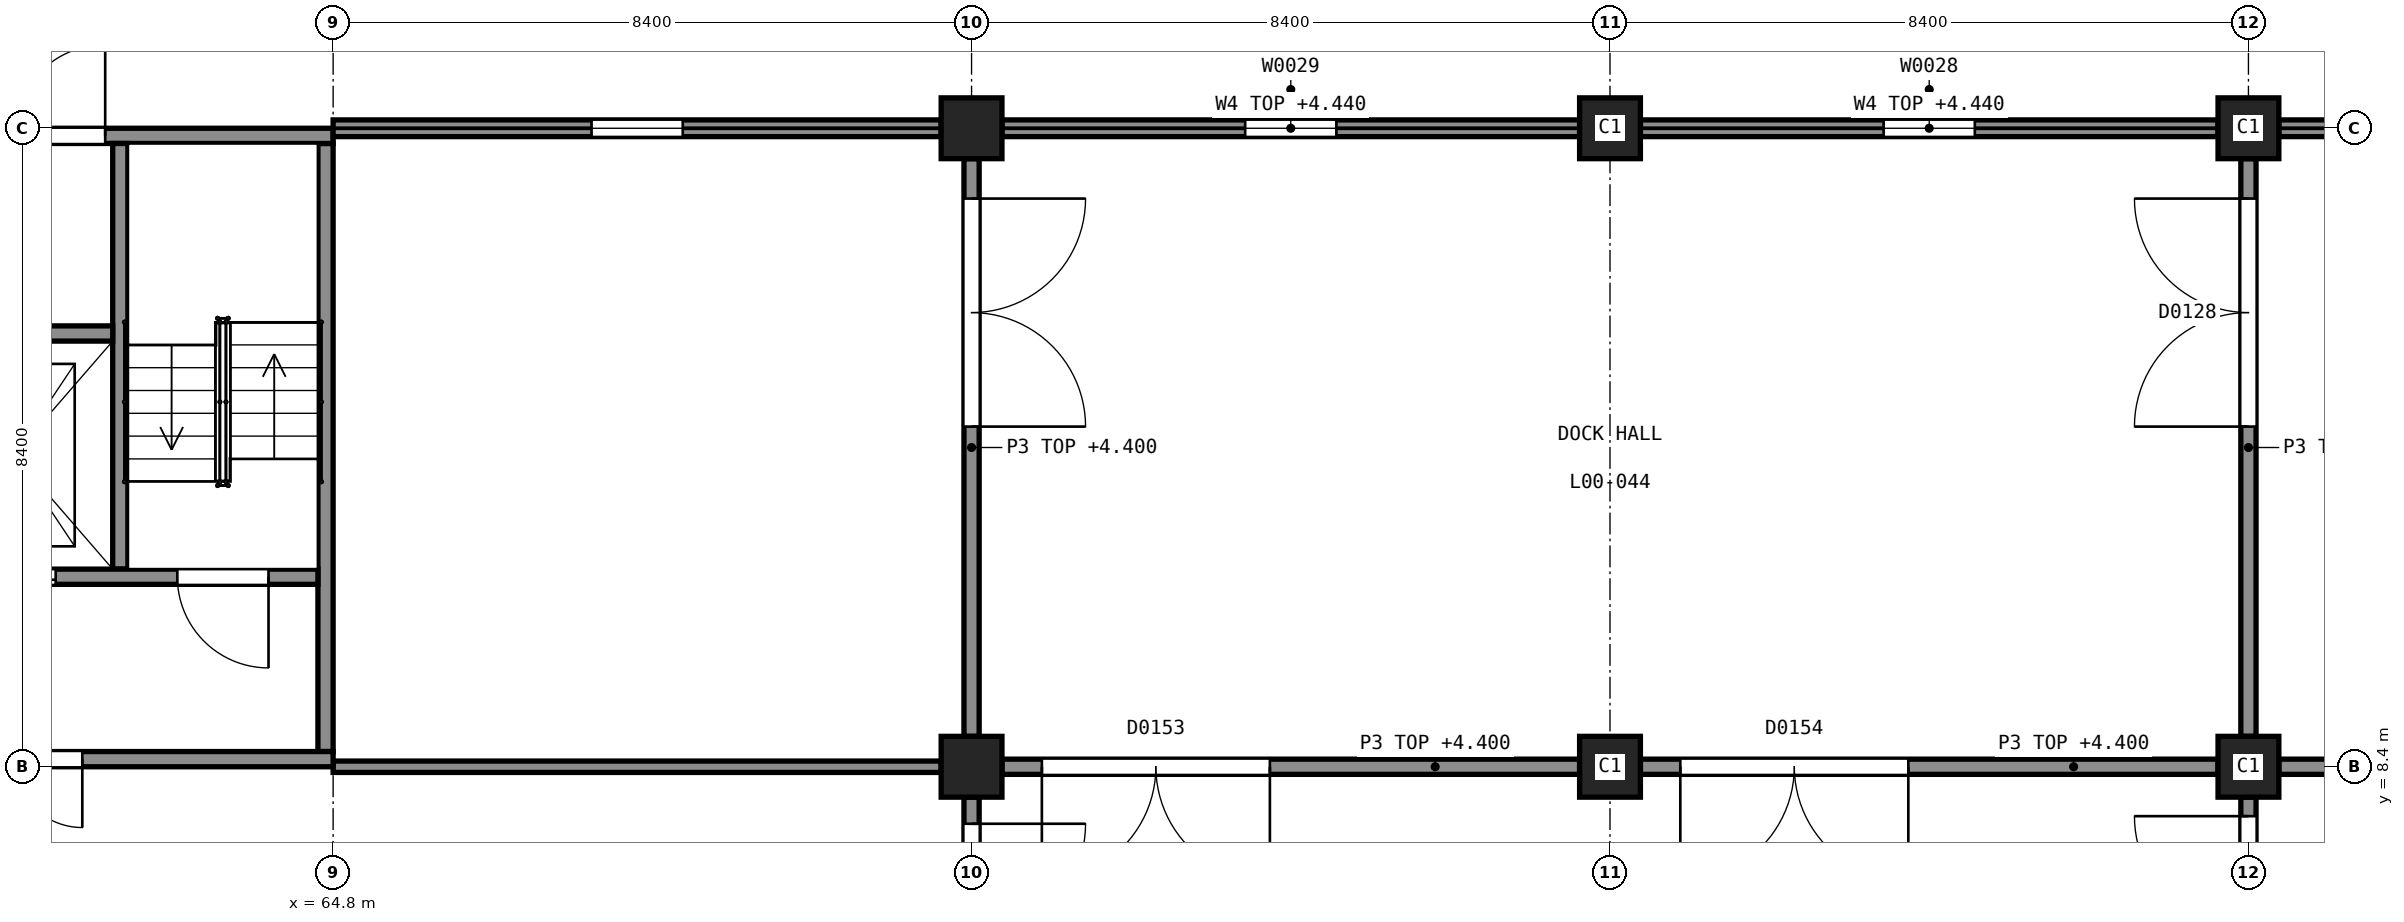
"""IFC4 building model, lengths in metres.
Left out: names, types, materials, properties, quantities, classifications, styles, units other than length and angle.
Written with IfcOpenShell. Run it as: python <this file> out.ifc"""

import sys

from ifc_helpers import new_model, si_unit, direction, frame, frame_2d, origin, origin_2d, place, context, subcontext, project, spatial, rectangle, extrude, element, fill, save


model = new_model("IFC4")
c1 = context("Model", 3, precision=1e-05, world=origin(), true_north=direction((0.0, 1.0)))
c2 = subcontext(c1, "Body", "Model", "MODEL_VIEW")
j1 = project(units=[si_unit("LENGTHUNIT", "METRE"), si_unit("PLANEANGLEUNIT", "RADIAN")], contexts=[c1])
p1 = place(None, origin())
s1 = spatial("IfcSite", under=j1, at=p1, CompositionType="ELEMENT")
p2 = place(p1, origin())
s2 = spatial("IfcBuilding", under=s1, at=p2, CompositionType="ELEMENT")
p3 = place(p2, origin())
s3 = spatial("IfcBuildingStorey", under=s2, at=p3, CompositionType="ELEMENT", Elevation=0.0)
p4 = place(p3, frame((56.4, 8.5, -1.8), z_axis=(0.0, 0.0, 1.0), x_axis=(1.0, 0.0, 0.0)))
e1 = element("IfcWall", 1, at=p4, inside=s3, PredefinedType="SHEAR", context=c2, shape_type="SweptSolid", body=[
    extrude(rectangle(XDim=8.4, YDim=0.2, at=frame_2d((4.2, 0.0))), origin(), (0.0, 0.0, 1.0), 7.3),
])
p5 = place(p4, frame((3.3, 0.0, 1.8)))
e2 = element("IfcOpeningElement", 2, at=p5, cuts=e1, PredefinedType="OPENING", context=c2, shape_type="SweptSolid", body=[
    extrude(rectangle(XDim=1.8, YDim=2.1, at=frame_2d((0.9, 1.05))), frame((0.0, 0.11, 0.0), z_axis=(0.0, -1.0, 0.0), x_axis=(1.0, 0.0, 0.0)), (0.0, 0.0, 1.0), 0.22),
])
p6 = place(p3, frame((56.4, 16.7, -1.8), z_axis=(0.0, 0.0, 1.0), x_axis=(1.0, 0.0, 0.0)))
e3 = element("IfcWall", 3, at=p6, inside=s3, PredefinedType="SHEAR", context=c2, shape_type="SweptSolid", body=[
    extrude(rectangle(XDim=8.4, YDim=0.2, at=frame_2d((4.2, 0.0))), origin(), (0.0, 0.0, 1.0), 7.3),
])
p7 = place(p6, frame((3.001, 0.0, 1.8)))
e4 = element("IfcOpeningElement", 4, at=p7, cuts=e3, PredefinedType="OPENING", context=c2, shape_type="SweptSolid", body=[
    extrude(rectangle(XDim=2.4, YDim=2.1, at=frame_2d((1.2, 1.05))), frame((0.0, 0.11, 0.0), z_axis=(0.0, -1.0, 0.0), x_axis=(1.0, 0.0, 0.0)), (0.0, 0.0, 1.0), 0.22),
])
p8 = place(p3, frame((64.7, 8.6, -1.8), z_axis=(0.0, 0.0, 1.0), x_axis=(0.0, 1.0, 0.0)))
e5 = element("IfcWall", 5, at=p8, inside=s3, PredefinedType="SHEAR", context=c2, shape_type="SweptSolid", body=[
    extrude(rectangle(XDim=8.0, YDim=0.2, at=frame_2d((4.0, 0.0))), origin(), (0.0, 0.0, 1.0), 7.3),
])
p9 = place(p3, frame((56.6, 10.9, -1.8), z_axis=(0.0, 0.0, 1.0), x_axis=(1.0, 0.0, 0.0)))
e6 = element("IfcWall", 6, at=p9, inside=s3, PredefinedType="SHEAR", context=c2, shape_type="SweptSolid", body=[
    extrude(rectangle(XDim=8.0, YDim=0.2, at=frame_2d((4.0, 0.0))), origin(), (0.0, 0.0, 1.0), 7.3),
])
p10 = place(p9, frame((0.65, 0.0, 1.8)))
e7 = element("IfcOpeningElement", 7, at=p10, cuts=e6, PredefinedType="OPENING", context=c2, shape_type="SweptSolid", body=[
    extrude(rectangle(XDim=1.2, YDim=2.1, at=frame_2d((0.6, 1.05))), frame((0.0, 0.11, 0.0), z_axis=(0.0, -1.0, 0.0), x_axis=(1.0, 0.0, 0.0)), (0.0, 0.0, 1.0), 0.22),
])
p11 = place(p9, frame((6.15, 0.0, 1.8)))
e8 = element("IfcOpeningElement", 8, at=p11, cuts=e6, PredefinedType="OPENING", context=c2, shape_type="SweptSolid", body=[
    extrude(rectangle(XDim=1.2, YDim=2.1, at=frame_2d((0.6, 1.05))), frame((0.0, 0.11, 0.0), z_axis=(0.0, -1.0, 0.0), x_axis=(1.0, 0.0, 0.0)), (0.0, 0.0, 1.0), 0.22),
])
p12 = place(p9, frame((3.45, 0.0, 1.8)))
e9 = element("IfcOpeningElement", 9, at=p12, cuts=e6, PredefinedType="OPENING", context=c2, shape_type="SweptSolid", body=[
    extrude(rectangle(XDim=1.1, YDim=2.1, at=frame_2d((0.55, 1.05))), frame((0.0, 0.11, 0.0), z_axis=(0.0, -1.0, 0.0), x_axis=(1.0, 0.0, 0.0)), (0.0, 0.0, 1.0), 0.22),
])
p13 = place(p3, frame((62.0, 11.0, -1.8), z_axis=(0.0, 0.0, 1.0), x_axis=(0.0, 1.0, 0.0)))
e10 = element("IfcWall", 10, at=p13, inside=s3, PredefinedType="SHEAR", context=c2, shape_type="SweptSolid", body=[
    extrude(rectangle(XDim=5.6, YDim=0.2, at=frame_2d((2.8, 0.0))), origin(), (0.0, 0.0, 1.0), 7.3),
])
p14 = place(p3, frame((59.3, 14.1, -1.8), z_axis=(0.0, 0.0, 1.0), x_axis=(1.0, 0.0, 0.0)))
e11 = element("IfcWall", 11, at=p14, inside=s3, PredefinedType="SHEAR", context=c2, shape_type="SweptSolid", body=[
    extrude(rectangle(XDim=2.6, YDim=0.2, at=frame_2d((1.3, 0.0))), origin(), (0.0, 0.0, 1.0), 7.3),
])
for number, where, z_axis, x_axis in (
    (12, (73.2, 8.4, -0.3), (0.0, 0.0, 1.0), (1.0, 0.0, 0.0)),
    (13, (73.2, 16.8, -0.3), (0.0, 0.0, 1.0), (1.0, 0.0, 0.0)),
    (14, (81.6, 8.4, -0.3), (0.0, 0.0, 1.0), (1.0, 0.0, 0.0)),
    (15, (81.6, 16.8, -0.3), (0.0, 0.0, 1.0), (1.0, 0.0, 0.0)),
    (16, (90.0, 8.4, -0.3), (0.0, 0.0, 1.0), (1.0, 0.0, 0.0)),
    (17, (90.0, 16.8, -0.3), (0.0, 0.0, 1.0), (1.0, 0.0, 0.0)),
):
    element("IfcColumn", number, at=place(p3, frame(where, z_axis=z_axis, x_axis=x_axis)), inside=s3, PredefinedType="COLUMN", context=c2, shape_type="SweptSolid", body=[
        extrude(rectangle(XDim=0.8, YDim=0.8, at=origin_2d()), origin(), (0.0, 0.0, 1.0), 5.8),
    ])
p15 = place(p3, frame((90.4, 16.8, 0.0), z_axis=(0.0, 0.0, 1.0), x_axis=(1.0, 0.0, 0.0)))
e18 = element("IfcWall", 18, at=p15, inside=s3, PredefinedType="SOLIDWALL", context=c2, shape_type="SweptSolid", body=[
    extrude(rectangle(XDim=7.6, YDim=0.22, at=frame_2d((3.8, 0.0))), origin(), (0.0, 0.0, 1.0), 4.44),
])
p16 = place(p15, frame((3.2, 0.0, 2.1)))
e19 = element("IfcOpeningElement", 19, at=p16, cuts=e18, PredefinedType="OPENING", context=c2, shape_type="SweptSolid", body=[
    extrude(rectangle(XDim=1.2, YDim=0.6, at=frame_2d((0.6, 0.3))), frame((0.0, 0.12, 0.0), z_axis=(0.0, -1.0, 0.0), x_axis=(1.0, 0.0, 0.0)), (0.0, 0.0, 1.0), 0.24),
])
p17 = place(p3, frame((82.0, 16.8, 0.0), z_axis=(0.0, 0.0, 1.0), x_axis=(1.0, 0.0, 0.0)))
e20 = element("IfcWall", 20, at=p17, inside=s3, PredefinedType="SOLIDWALL", context=c2, shape_type="SweptSolid", body=[
    extrude(rectangle(XDim=7.6, YDim=0.22, at=frame_2d((3.8, 0.0))), origin(), (0.0, 0.0, 1.0), 4.44),
])
p18 = place(p17, frame((3.2, 0.0, 2.1)))
e21 = element("IfcOpeningElement", 21, at=p18, cuts=e20, PredefinedType="OPENING", context=c2, shape_type="SweptSolid", body=[
    extrude(rectangle(XDim=1.2, YDim=0.6, at=frame_2d((0.6, 0.3))), frame((0.0, 0.12, 0.0), z_axis=(0.0, -1.0, 0.0), x_axis=(1.0, 0.0, 0.0)), (0.0, 0.0, 1.0), 0.24),
])
p19 = place(p3, frame((73.6, 16.8, 0.0), z_axis=(0.0, 0.0, 1.0), x_axis=(1.0, 0.0, 0.0)))
e22 = element("IfcWall", 22, at=p19, inside=s3, PredefinedType="SOLIDWALL", context=c2, shape_type="SweptSolid", body=[
    extrude(rectangle(XDim=7.6, YDim=0.22, at=frame_2d((3.8, 0.0))), origin(), (0.0, 0.0, 1.0), 4.44),
])
p20 = place(p19, frame((3.2, 0.0, 2.1)))
e23 = element("IfcOpeningElement", 23, at=p20, cuts=e22, PredefinedType="OPENING", context=c2, shape_type="SweptSolid", body=[
    extrude(rectangle(XDim=1.2, YDim=0.6, at=frame_2d((0.6, 0.3))), frame((0.0, 0.12, 0.0), z_axis=(0.0, -1.0, 0.0), x_axis=(1.0, 0.0, 0.0)), (0.0, 0.0, 1.0), 0.24),
])
p21 = place(p3, frame((64.8, 16.8, 0.0), z_axis=(0.0, 0.0, 1.0), x_axis=(1.0, 0.0, 0.0)))
e24 = element("IfcWall", 24, at=p21, inside=s3, PredefinedType="SOLIDWALL", context=c2, shape_type="SweptSolid", body=[
    extrude(rectangle(XDim=8.0, YDim=0.22, at=frame_2d((4.0, 0.0))), origin(), (0.0, 0.0, 1.0), 4.44),
])
p22 = place(p21, frame((3.4, 0.0, 2.1)))
e25 = element("IfcOpeningElement", 25, at=p22, cuts=e24, PredefinedType="OPENING", context=c2, shape_type="SweptSolid", body=[
    extrude(rectangle(XDim=1.2, YDim=0.6, at=frame_2d((0.6, 0.3))), frame((0.0, 0.12, 0.0), z_axis=(0.0, -1.0, 0.0), x_axis=(1.0, 0.0, 0.0)), (0.0, 0.0, 1.0), 0.24),
])
p23 = place(p3, frame((73.2, 8.8, 0.0), z_axis=(0.0, 0.0, 1.0), x_axis=(0.0, 1.0, 0.0)))
e26 = element("IfcWall", 26, at=p23, inside=s3, PredefinedType="PARTITIONING", context=c2, shape_type="SweptSolid", body=[
    extrude(rectangle(XDim=7.6, YDim=0.2, at=frame_2d((3.8, 0.0))), origin(), (0.0, 0.0, 1.0), 4.4),
])
p24 = place(p23, frame((4.075, 0.0, 0.0)))
e27 = element("IfcOpeningElement", 27, at=p24, cuts=e26, PredefinedType="OPENING", context=c2, shape_type="SweptSolid", body=[
    extrude(rectangle(XDim=3.0, YDim=3.0, at=frame_2d((1.5, 1.5))), frame((0.0, 0.11, 0.0), z_axis=(0.0, -1.0, 0.0), x_axis=(1.0, 0.0, 0.0)), (0.0, 0.0, 1.0), 0.22),
])
p25 = place(p3, frame((64.8, 8.4, 0.0), z_axis=(0.0, 0.0, 1.0), x_axis=(1.0, 0.0, 0.0)))
e28 = element("IfcWall", 28, at=p25, inside=s3, PredefinedType="PARTITIONING", context=c2, shape_type="SweptSolid", body=[
    extrude(rectangle(XDim=8.0, YDim=0.15, at=frame_2d((4.0, 0.0))), origin(), (0.0, 0.0, 1.0), 4.4),
])
p26 = place(p3, frame((90.0, 8.8, 0.0), z_axis=(0.0, 0.0, 1.0), x_axis=(0.0, 1.0, 0.0)))
e29 = element("IfcWall", 29, at=p26, inside=s3, PredefinedType="PARTITIONING", context=c2, shape_type="SweptSolid", body=[
    extrude(rectangle(XDim=7.6, YDim=0.2, at=frame_2d((3.8, 0.0))), origin(), (0.0, 0.0, 1.0), 4.4),
])
p27 = place(p26, frame((4.075, 0.0, 0.0)))
e30 = element("IfcOpeningElement", 30, at=p27, cuts=e29, PredefinedType="OPENING", context=c2, shape_type="SweptSolid", body=[
    extrude(rectangle(XDim=3.0, YDim=3.0, at=frame_2d((1.5, 1.5))), frame((0.0, 0.11, 0.0), z_axis=(0.0, -1.0, 0.0), x_axis=(1.0, 0.0, 0.0)), (0.0, 0.0, 1.0), 0.22),
])
p28 = place(p3, frame((73.6, 8.4, 0.0), z_axis=(0.0, 0.0, 1.0), x_axis=(1.0, 0.0, 0.0)))
e31 = element("IfcWall", 31, at=p28, inside=s3, PredefinedType="PARTITIONING", context=c2, shape_type="SweptSolid", body=[
    extrude(rectangle(XDim=7.6, YDim=0.2, at=frame_2d((3.8, 0.0))), origin(), (0.0, 0.0, 1.0), 4.4),
])
p29 = place(p28, frame((0.525, 0.0, 0.0)))
e32 = element("IfcOpeningElement", 32, at=p29, cuts=e31, PredefinedType="OPENING", context=c2, shape_type="SweptSolid", body=[
    extrude(rectangle(XDim=3.0, YDim=3.0, at=frame_2d((1.5, 1.5))), frame((0.0, 0.11, 0.0), z_axis=(0.0, -1.0, 0.0), x_axis=(1.0, 0.0, 0.0)), (0.0, 0.0, 1.0), 0.22),
])
p30 = place(p3, frame((82.0, 8.4, 0.0), z_axis=(0.0, 0.0, 1.0), x_axis=(1.0, 0.0, 0.0)))
e33 = element("IfcWall", 33, at=p30, inside=s3, PredefinedType="PARTITIONING", context=c2, shape_type="SweptSolid", body=[
    extrude(rectangle(XDim=7.6, YDim=0.2, at=frame_2d((3.8, 0.0))), origin(), (0.0, 0.0, 1.0), 4.4),
])
p31 = place(p30, frame((0.525, 0.0, 0.0)))
e34 = element("IfcOpeningElement", 34, at=p31, cuts=e33, PredefinedType="OPENING", context=c2, shape_type="SweptSolid", body=[
    extrude(rectangle(XDim=3.0, YDim=3.0, at=frame_2d((1.5, 1.5))), frame((0.0, 0.11, 0.0), z_axis=(0.0, -1.0, 0.0), x_axis=(1.0, 0.0, 0.0)), (0.0, 0.0, 1.0), 0.22),
])
p32 = place(p3, frame((90.4, 8.4, 0.0), z_axis=(0.0, 0.0, 1.0), x_axis=(1.0, 0.0, 0.0)))
e35 = element("IfcWall", 35, at=p32, inside=s3, PredefinedType="PARTITIONING", context=c2, shape_type="SweptSolid", body=[
    extrude(rectangle(XDim=7.6, YDim=0.2, at=frame_2d((3.8, 0.0))), origin(), (0.0, 0.0, 1.0), 4.4),
])
p33 = place(p3, frame((73.2, 4.3, 0.0), z_axis=(0.0, 0.0, 1.0), x_axis=(0.0, 1.0, 0.0)))
e36 = element("IfcWall", 36, at=p33, inside=s3, PredefinedType="PARTITIONING", context=c2, shape_type="SweptSolid", body=[
    extrude(rectangle(XDim=3.7, YDim=0.2, at=frame_2d((1.85, 0.0))), origin(), (0.0, 0.0, 1.0), 4.4),
])
p34 = place(p33, frame((0.35, 0.0, 0.0)))
e37 = element("IfcOpeningElement", 37, at=p34, cuts=e36, PredefinedType="OPENING", context=c2, shape_type="SweptSolid", body=[
    extrude(rectangle(XDim=3.0, YDim=3.0, at=frame_2d((1.5, 1.5))), frame((0.0, 0.11, 0.0), z_axis=(0.0, -1.0, 0.0), x_axis=(1.0, 0.0, 0.0)), (0.0, 0.0, 1.0), 0.22),
])
p35 = place(p3, frame((90.0, 4.5, 0.0), z_axis=(0.0, 0.0, 1.0), x_axis=(0.0, 1.0, 0.0)))
e38 = element("IfcWall", 38, at=p35, inside=s3, PredefinedType="PARTITIONING", context=c2, shape_type="SweptSolid", body=[
    extrude(rectangle(XDim=3.5, YDim=0.2, at=frame_2d((1.75, 0.0))), origin(), (0.0, 0.0, 1.0), 4.4),
])
p36 = place(p35, frame((0.25, 0.0, 0.0)))
e39 = element("IfcOpeningElement", 39, at=p36, cuts=e38, PredefinedType="OPENING", context=c2, shape_type="SweptSolid", body=[
    extrude(rectangle(XDim=3.0, YDim=3.0, at=frame_2d((1.5, 1.5))), frame((0.0, 0.11, 0.0), z_axis=(0.0, -1.0, 0.0), x_axis=(1.0, 0.0, 0.0)), (0.0, 0.0, 1.0), 0.22),
])
p37 = place(p18, origin())
e40 = element("IfcWindow", 40, at=p37, inside=s3, PartitioningType="SINGLE_PANEL", PredefinedType="WINDOW", context=c2, shape_type="SweptSolid", body=[
    extrude(rectangle(XDim=1.2, YDim=0.6, at=frame_2d((0.6, 0.3))), frame((0.0, -0.03, 0.0), z_axis=(0.0, -1.0, 0.0), x_axis=(1.0, 0.0, 0.0)), (0.0, 0.0, 1.0), 0.06),
])
fill(e21, e40)
p38 = place(p20, origin())
e41 = element("IfcWindow", 41, at=p38, inside=s3, PartitioningType="SINGLE_PANEL", PredefinedType="WINDOW", context=c2, shape_type="SweptSolid", body=[
    extrude(rectangle(XDim=1.2, YDim=0.6, at=frame_2d((0.6, 0.3))), frame((0.0, -0.03, 0.0), z_axis=(0.0, -1.0, 0.0), x_axis=(1.0, 0.0, 0.0)), (0.0, 0.0, 1.0), 0.06),
])
fill(e23, e41)
p39 = place(p22, origin())
e42 = element("IfcWindow", 42, at=p39, inside=s3, PartitioningType="SINGLE_PANEL", PredefinedType="WINDOW", context=c2, shape_type="SweptSolid", body=[
    extrude(rectangle(XDim=1.2, YDim=0.6, at=frame_2d((0.6, 0.3))), frame((0.0, -0.03, 0.0), z_axis=(0.0, -1.0, 0.0), x_axis=(1.0, 0.0, 0.0)), (0.0, 0.0, 1.0), 0.06),
])
fill(e25, e42)
p40 = place(p7, origin())
e43 = element("IfcDoor", 43, at=p40, inside=s3, OperationType="DOUBLE_DOOR_SINGLE_SWING", PredefinedType="DOOR", context=c2, shape_type="SweptSolid", body=[
    extrude(rectangle(XDim=2.4, YDim=2.1, at=frame_2d((1.2, 1.05))), frame((0.0, 0.025, 0.0), z_axis=(0.0, -1.0, 0.0), x_axis=(1.0, 0.0, 0.0)), (0.0, 0.0, 1.0), 0.05),
])
fill(e4, e43)
p41 = place(p24, origin())
e44 = element("IfcDoor", 44, at=p41, inside=s3, OperationType="DOUBLE_DOOR_SINGLE_SWING", PredefinedType="DOOR", context=c2, shape_type="SweptSolid", body=[
    extrude(rectangle(XDim=3.0, YDim=3.0, at=frame_2d((1.5, 1.5))), frame((0.0, 0.025, 0.0), z_axis=(0.0, -1.0, 0.0), x_axis=(1.0, 0.0, 0.0)), (0.0, 0.0, 1.0), 0.05),
])
fill(e27, e44)
p42 = place(p27, origin())
e45 = element("IfcDoor", 45, at=p42, inside=s3, OperationType="DOUBLE_DOOR_SINGLE_SWING", PredefinedType="DOOR", context=c2, shape_type="SweptSolid", body=[
    extrude(rectangle(XDim=3.0, YDim=3.0, at=frame_2d((1.5, 1.5))), frame((0.0, 0.025, 0.0), z_axis=(0.0, -1.0, 0.0), x_axis=(1.0, 0.0, 0.0)), (0.0, 0.0, 1.0), 0.05),
])
fill(e30, e45)
p43 = place(p29, origin())
e46 = element("IfcDoor", 46, at=p43, inside=s3, OperationType="DOUBLE_DOOR_SINGLE_SWING", PredefinedType="DOOR", context=c2, shape_type="SweptSolid", body=[
    extrude(rectangle(XDim=3.0, YDim=3.0, at=frame_2d((1.5, 1.5))), frame((0.0, 0.025, 0.0), z_axis=(0.0, -1.0, 0.0), x_axis=(1.0, 0.0, 0.0)), (0.0, 0.0, 1.0), 0.05),
])
fill(e32, e46)
p44 = place(p31, origin())
e47 = element("IfcDoor", 47, at=p44, inside=s3, OperationType="DOUBLE_DOOR_SINGLE_SWING", PredefinedType="DOOR", context=c2, shape_type="SweptSolid", body=[
    extrude(rectangle(XDim=3.0, YDim=3.0, at=frame_2d((1.5, 1.5))), frame((0.0, 0.025, 0.0), z_axis=(0.0, -1.0, 0.0), x_axis=(1.0, 0.0, 0.0)), (0.0, 0.0, 1.0), 0.05),
])
fill(e34, e47)
p45 = place(p34, origin())
e48 = element("IfcDoor", 48, at=p45, inside=s3, OperationType="DOUBLE_DOOR_SINGLE_SWING", PredefinedType="DOOR", context=c2, shape_type="SweptSolid", body=[
    extrude(rectangle(XDim=3.0, YDim=3.0, at=frame_2d((1.5, 1.5))), frame((0.0, 0.025, 0.0), z_axis=(0.0, -1.0, 0.0), x_axis=(1.0, 0.0, 0.0)), (0.0, 0.0, 1.0), 0.05),
])
fill(e37, e48)
p46 = place(p36, origin())
e49 = element("IfcDoor", 49, at=p46, inside=s3, OperationType="DOUBLE_DOOR_SINGLE_SWING", PredefinedType="DOOR", context=c2, shape_type="SweptSolid", body=[
    extrude(rectangle(XDim=3.0, YDim=3.0, at=frame_2d((1.5, 1.5))), frame((0.0, 0.025, 0.0), z_axis=(0.0, -1.0, 0.0), x_axis=(1.0, 0.0, 0.0)), (0.0, 0.0, 1.0), 0.05),
])
fill(e39, e49)
p47 = place(p5, origin())
e50 = element("IfcDoor", 50, at=p47, inside=s3, OperationType="DOUBLE_DOOR_SINGLE_SWING", PredefinedType="DOOR", context=c2, shape_type="SweptSolid", body=[
    extrude(rectangle(XDim=1.8, YDim=2.1, at=frame_2d((0.9, 1.05))), frame((0.0, 0.025, 0.0), z_axis=(0.0, -1.0, 0.0), x_axis=(1.0, 0.0, 0.0)), (0.0, 0.0, 1.0), 0.05),
])
fill(e2, e50)
p48 = place(p11, origin())
e51 = element("IfcDoor", 51, at=p48, inside=s3, OperationType="SINGLE_SWING_RIGHT", PredefinedType="DOOR", context=c2, shape_type="SweptSolid", body=[
    extrude(rectangle(XDim=1.2, YDim=2.1, at=frame_2d((0.6, 1.05))), frame((0.0, 0.025, 0.0), z_axis=(0.0, -1.0, 0.0), x_axis=(1.0, 0.0, 0.0)), (0.0, 0.0, 1.0), 0.05),
])
fill(e8, e51)
p49 = place(p12, origin())
e52 = element("IfcDoor", 52, at=p49, inside=s3, OperationType="DOUBLE_DOOR_SLIDING", PredefinedType="DOOR", context=c2, shape_type="SweptSolid", body=[
    extrude(rectangle(XDim=1.1, YDim=2.1, at=frame_2d((0.55, 1.05))), frame((0.0, 0.025, 0.0), z_axis=(0.0, -1.0, 0.0), x_axis=(1.0, 0.0, 0.0)), (0.0, 0.0, 1.0), 0.05),
])
fill(e9, e52)
save(model, sys.argv[1])
